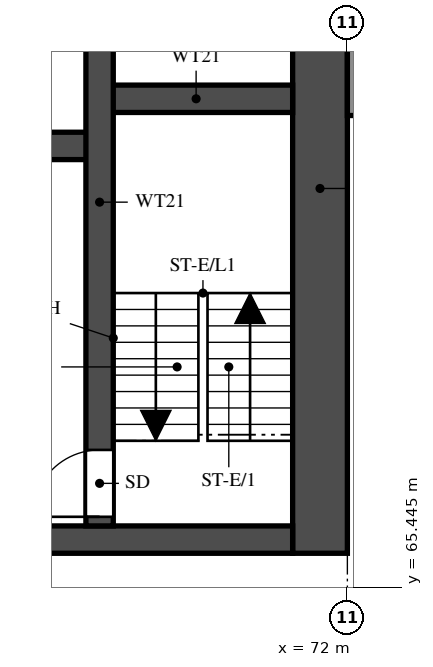
"""IFC4 building model, lengths in metres.
Left out: names, types, materials, properties, quantities, classifications, styles, units other than length and angle.
Written with IfcOpenShell. Run it as: python <this file> out.ifc"""

import sys

from ifc_helpers import new_model, si_unit, direction, frame, frame_2d, origin, place, context, subcontext, project, spatial, rectangle, extrude, element, fill, save


model = new_model("IFC4")
c1 = context("Model", 3, precision=1e-05, world=origin(), true_north=direction((0.0, 1.0)))
c2 = subcontext(c1, "Body", "Model", "MODEL_VIEW")
j1 = project(units=[si_unit("LENGTHUNIT", "METRE"), si_unit("PLANEANGLEUNIT", "RADIAN")], contexts=[c1])
p1 = place(None, origin())
s1 = spatial("IfcSite", under=j1, at=p1, CompositionType="ELEMENT")
p2 = place(p1, origin())
s2 = spatial("IfcBuilding", under=s1, at=p2, CompositionType="ELEMENT")
p3 = place(p2, frame((0.0, 0.0, 34.0)))
s3 = spatial("IfcBuildingStorey", under=s2, at=p3, CompositionType="ELEMENT", Elevation=34.0)
p4 = place(p3, frame((71.55, 66.0, 0.0), z_axis=(0.0, 0.0, 1.0), x_axis=(0.0, 1.0, 0.0)))
e1 = element("IfcWall", 1, at=p4, inside=s3, PredefinedType="SHEAR", context=c2, shape_type="SweptSolid", body=[
    extrude(rectangle(XDim=12.0, YDim=0.9, at=frame_2d((6.0, 0.0))), origin(), (0.0, 0.0, 1.0), 3.18),
])
p5 = place(p3, frame((29.7, 66.225, 0.0), z_axis=(0.0, 0.0, 1.0), x_axis=(1.0, 0.0, 0.0)))
e2 = element("IfcWall", 2, at=p5, inside=s3, PredefinedType="SHEAR", context=c2, shape_type="SweptSolid", body=[
    extrude(rectangle(XDim=41.4, YDim=0.45, at=frame_2d((20.7, 0.0))), origin(), (0.0, 0.0, 1.0), 3.18),
])
p6 = place(p5, frame((0.925, 0.0, 0.0)))
e3 = element("IfcOpeningElement", 3, at=p6, cuts=e2, PredefinedType="OPENING", context=c2, shape_type="SweptSolid", body=[
    extrude(rectangle(XDim=1.1, YDim=2.1, at=frame_2d((0.55, 1.05))), frame((0.0, 0.235, 0.0), z_axis=(0.0, -1.0, 0.0), x_axis=(1.0, 0.0, 0.0)), (0.0, 0.0, 1.0), 0.47),
])
p7 = place(p5, frame((3.738, 0.0, 0.0)))
e4 = element("IfcOpeningElement", 4, at=p7, cuts=e2, PredefinedType="OPENING", context=c2, shape_type="SweptSolid", body=[
    extrude(rectangle(XDim=1.8, YDim=2.1, at=frame_2d((0.9, 1.05))), frame((0.0, 0.235, 0.0), z_axis=(0.0, -1.0, 0.0), x_axis=(1.0, 0.0, 0.0)), (0.0, 0.0, 1.0), 0.47),
])
p8 = place(p3, frame((32.875, 72.7, 0.0), z_axis=(0.0, 0.0, 1.0), x_axis=(1.0, 0.0, 0.0)))
e5 = element("IfcWall", 5, at=p8, inside=s3, PredefinedType="SHEAR", context=c2, shape_type="SweptSolid", body=[
    extrude(rectangle(XDim=35.05, YDim=0.45, at=frame_2d((17.525, 0.0))), origin(), (0.0, 0.0, 1.0), 3.18),
])
p9 = place(p8, frame((19.8, 0.0, 0.0)))
e6 = element("IfcOpeningElement", 6, at=p9, cuts=e5, PredefinedType="OPENING", context=c2, shape_type="SweptSolid", body=[
    extrude(rectangle(XDim=1.1, YDim=2.1, at=frame_2d((0.55, 1.05))), frame((0.0, 0.235, 0.0), z_axis=(0.0, -1.0, 0.0), x_axis=(1.0, 0.0, 0.0)), (0.0, 0.0, 1.0), 0.47),
])
p10 = place(p8, frame((27.65, 0.0, 0.0)))
e7 = element("IfcOpeningElement", 7, at=p10, cuts=e5, PredefinedType="OPENING", context=c2, shape_type="SweptSolid", body=[
    extrude(rectangle(XDim=1.1, YDim=2.1, at=frame_2d((0.55, 1.05))), frame((0.0, 0.235, 0.0), z_axis=(0.0, -1.0, 0.0), x_axis=(1.0, 0.0, 0.0)), (0.0, 0.0, 1.0), 0.47),
])
p11 = place(p8, frame((30.25, 0.0, 0.0)))
e8 = element("IfcOpeningElement", 8, at=p11, cuts=e5, PredefinedType="OPENING", context=c2, shape_type="SweptSolid", body=[
    extrude(rectangle(XDim=1.1, YDim=2.1, at=frame_2d((0.55, 1.05))), frame((0.0, 0.235, 0.0), z_axis=(0.0, -1.0, 0.0), x_axis=(1.0, 0.0, 0.0)), (0.0, 0.0, 1.0), 0.47),
])
p12 = place(p8, frame((3.75, 0.0, 0.0)))
e9 = element("IfcOpeningElement", 9, at=p12, cuts=e5, PredefinedType="OPENING", context=c2, shape_type="SweptSolid", body=[
    extrude(rectangle(XDim=1.1, YDim=2.1, at=frame_2d((0.55, 1.05))), frame((0.0, 0.235, 0.0), z_axis=(0.0, -1.0, 0.0), x_axis=(1.0, 0.0, 0.0)), (0.0, 0.0, 1.0), 0.47),
])
p13 = place(p8, frame((6.5, 0.0, 0.0)))
e10 = element("IfcOpeningElement", 10, at=p13, cuts=e5, PredefinedType="OPENING", context=c2, shape_type="SweptSolid", body=[
    extrude(rectangle(XDim=1.1, YDim=2.1, at=frame_2d((0.55, 1.05))), frame((0.0, 0.235, 0.0), z_axis=(0.0, -1.0, 0.0), x_axis=(1.0, 0.0, 0.0)), (0.0, 0.0, 1.0), 0.47),
])
p14 = place(p8, frame((9.25, 0.0, 0.0)))
e11 = element("IfcOpeningElement", 11, at=p14, cuts=e5, PredefinedType="OPENING", context=c2, shape_type="SweptSolid", body=[
    extrude(rectangle(XDim=1.1, YDim=2.1, at=frame_2d((0.55, 1.05))), frame((0.0, 0.235, 0.0), z_axis=(0.0, -1.0, 0.0), x_axis=(1.0, 0.0, 0.0)), (0.0, 0.0, 1.0), 0.47),
])
p15 = place(p8, frame((12.0, 0.0, 0.0)))
e12 = element("IfcOpeningElement", 12, at=p15, cuts=e5, PredefinedType="OPENING", context=c2, shape_type="SweptSolid", body=[
    extrude(rectangle(XDim=1.1, YDim=2.1, at=frame_2d((0.55, 1.05))), frame((0.0, 0.235, 0.0), z_axis=(0.0, -1.0, 0.0), x_axis=(1.0, 0.0, 0.0)), (0.0, 0.0, 1.0), 0.47),
])
p16 = place(p8, frame((14.75, 0.0, 0.0)))
e13 = element("IfcOpeningElement", 13, at=p16, cuts=e5, PredefinedType="OPENING", context=c2, shape_type="SweptSolid", body=[
    extrude(rectangle(XDim=1.1, YDim=2.1, at=frame_2d((0.55, 1.05))), frame((0.0, 0.235, 0.0), z_axis=(0.0, -1.0, 0.0), x_axis=(1.0, 0.0, 0.0)), (0.0, 0.0, 1.0), 0.47),
])
p17 = place(p8, frame((17.5, 0.0, 0.0)))
e14 = element("IfcOpeningElement", 14, at=p17, cuts=e5, PredefinedType="OPENING", context=c2, shape_type="SweptSolid", body=[
    extrude(rectangle(XDim=1.1, YDim=2.1, at=frame_2d((0.55, 1.05))), frame((0.0, 0.235, 0.0), z_axis=(0.0, -1.0, 0.0), x_axis=(1.0, 0.0, 0.0)), (0.0, 0.0, 1.0), 0.47),
])
p18 = place(p8, frame((0.913, 0.0, 0.0)))
e15 = element("IfcOpeningElement", 15, at=p18, cuts=e5, PredefinedType="OPENING", context=c2, shape_type="SweptSolid", body=[
    extrude(rectangle(XDim=1.1, YDim=2.1, at=frame_2d((0.55, 1.05))), frame((0.0, 0.235, 0.0), z_axis=(0.0, -1.0, 0.0), x_axis=(1.0, 0.0, 0.0)), (0.0, 0.0, 1.0), 0.47),
])
p19 = place(p3, frame((67.925, 73.475, 0.0), z_axis=(0.0, 0.0, 1.0), x_axis=(1.0, 0.0, 0.0)))
e16 = element("IfcWall", 16, at=p19, inside=s3, PredefinedType="SHEAR", context=c2, shape_type="SweptSolid", body=[
    extrude(rectangle(XDim=3.175, YDim=0.45, at=frame_2d((1.587, 0.0))), origin(), (0.0, 0.0, 1.0), 3.18),
])
p20 = place(p3, frame((67.925, 66.45, 0.0), z_axis=(0.0, 0.0, 1.0), x_axis=(0.0, 1.0, 0.0)))
e17 = element("IfcWall", 17, at=p20, inside=s3, PredefinedType="SHEAR", context=c2, shape_type="SweptSolid", body=[
    extrude(rectangle(XDim=10.65, YDim=0.45, at=frame_2d((5.325, 0.0))), origin(), (0.0, 0.0, 1.0), 3.18),
])
p21 = place(p20, frame((0.15, 0.0, 0.0)))
e18 = element("IfcOpeningElement", 18, at=p21, cuts=e17, PredefinedType="OPENING", context=c2, shape_type="SweptSolid", body=[
    extrude(rectangle(XDim=1.1, YDim=2.1, at=frame_2d((0.55, 1.05))), frame((0.0, 0.235, 0.0), z_axis=(0.0, -1.0, 0.0), x_axis=(1.0, 0.0, 0.0)), (0.0, 0.0, 1.0), 0.47),
])
p22 = place(p3, frame((72.1, 73.2, 0.0), z_axis=(0.0, 0.0, 1.0), x_axis=(0.0, 1.0, 0.0)))
e19 = element("IfcWall", 19, at=p22, inside=s3, PredefinedType="SOLIDWALL", context=c2, shape_type="SweptSolid", body=[
    extrude(rectangle(XDim=4.8, YDim=0.2, at=frame_2d((2.4, 0.0))), origin(), (0.0, 0.0, 1.0), 3.18),
])
p23 = place(p21, origin())
e20 = element("IfcDoor", 20, at=p23, inside=s3, OperationType="SINGLE_SWING_LEFT", PredefinedType="DOOR", context=c2, shape_type="SweptSolid", body=[
    extrude(rectangle(XDim=1.1, YDim=2.1, at=frame_2d((0.55, 1.05))), frame((0.0, 0.025, 0.0), z_axis=(0.0, -1.0, 0.0), x_axis=(1.0, 0.0, 0.0)), (0.0, 0.0, 1.0), 0.05),
])
fill(e18, e20)
save(model, sys.argv[1])
